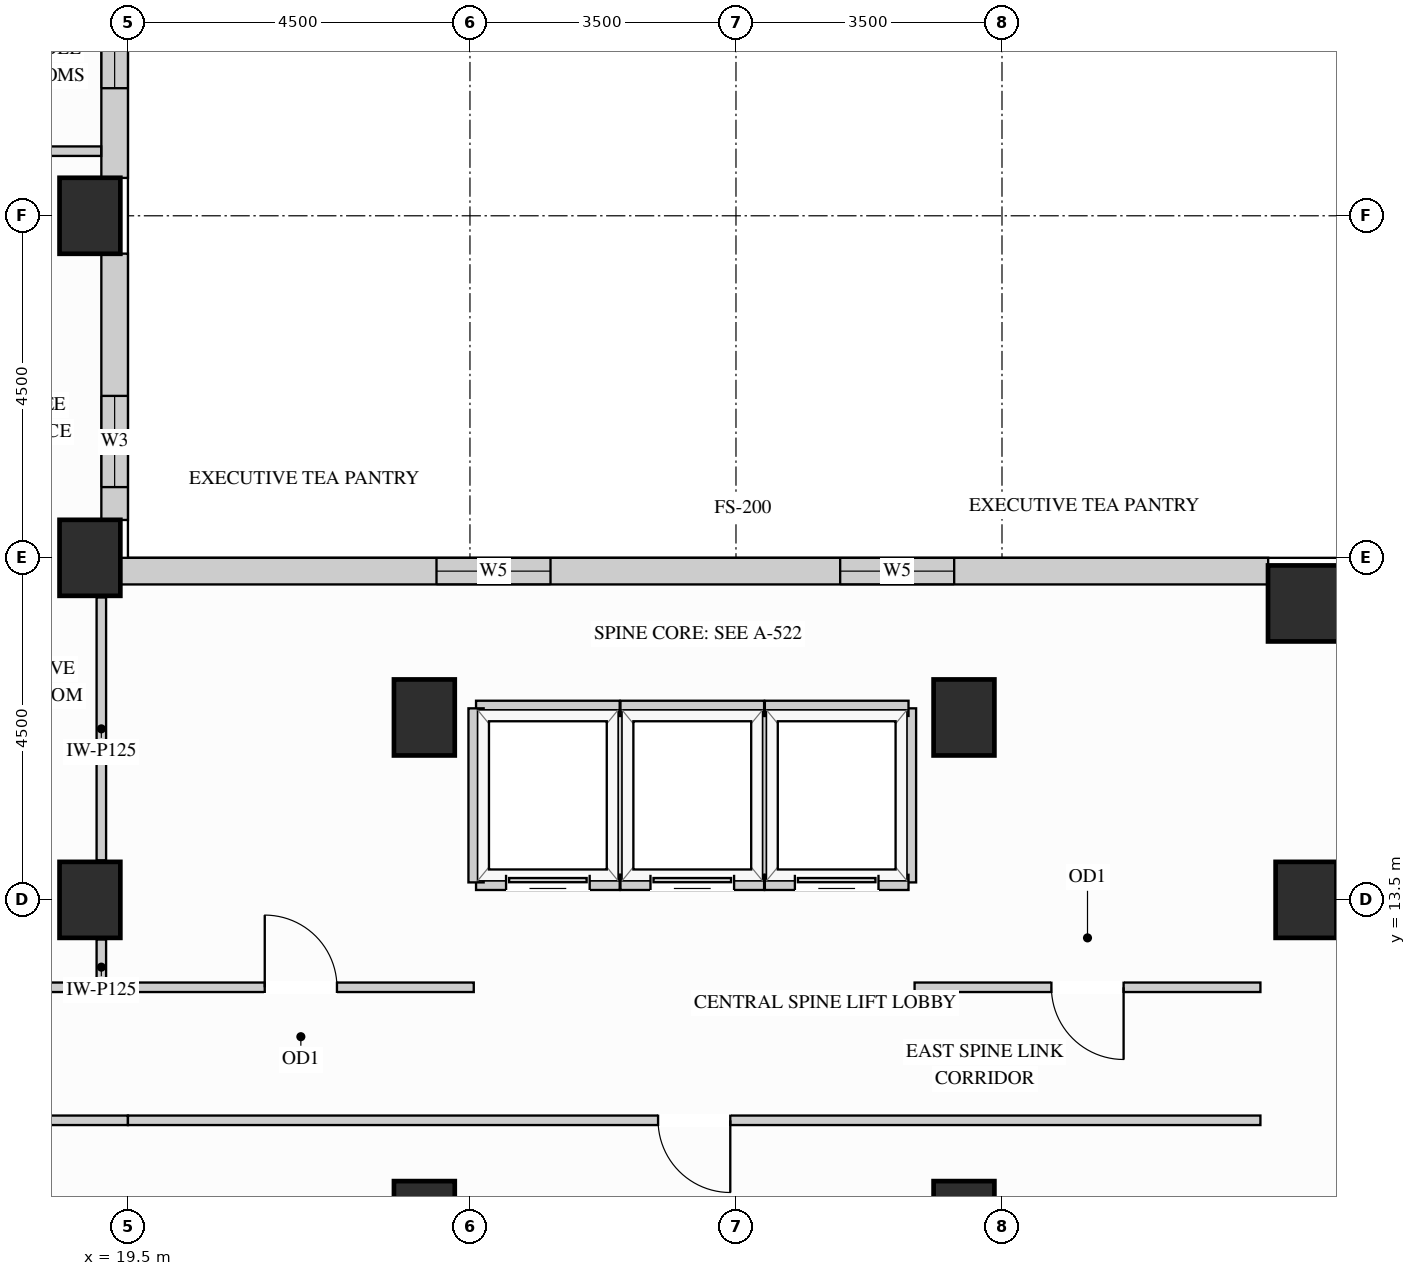
"""IFC4 building model, lengths in metres.
Left out: names, types, materials, properties, quantities, classifications, styles, units other than length and angle.
Written with IfcOpenShell. Run it as: python <this file> out.ifc"""

import sys

from ifc_helpers import new_model, si_unit, direction, frame, frame_2d, origin, origin_2d, place, context, subcontext, project, spatial, rectangle, extrude, source, transform, mapped, element, fill, save


model = new_model("IFC4")
c1 = context("Model", 3, precision=1e-05, world=origin(), true_north=direction((0.0, 1.0)))
c2 = subcontext(c1, "Body", "Model", "MODEL_VIEW")
j1 = project(units=[si_unit("LENGTHUNIT", "METRE"), si_unit("PLANEANGLEUNIT", "RADIAN")], contexts=[c1])
p1 = place(None, origin())
s1 = spatial("IfcSite", under=j1, at=p1, CompositionType="ELEMENT")
p2 = place(p1, origin())
s2 = spatial("IfcBuilding", under=s1, at=p2, CompositionType="ELEMENT")
p3 = place(p2, frame((0.0, 0.0, 179.1)))
s3 = spatial("IfcBuildingStorey", under=s2, at=p3, CompositionType="ELEMENT", Elevation=179.1)
m1 = source(origin(), c2, "Body", "SweptSolid", [
    extrude(rectangle(XDim=0.8, YDim=1.0, at=origin_2d()), origin(), (0.0, 0.0, 1.0), 3.4),
])
for number, where, z_axis, x_axis in (
    (1, (19.0, 13.5, 0.0), (0.0, 0.0, 1.0), (1.0, 0.0, 0.0)),
    (2, (19.0, 18.0, 0.0), (0.0, 0.0, 1.0), (1.0, 0.0, 0.0)),
    (3, (19.0, 22.5, 0.0), (0.0, 0.0, 1.0), (1.0, 0.0, 0.0)),
    (4, (35.0, 13.5, 0.0), (0.0, 0.0, 1.0), (1.0, 0.0, 0.0)),
    (5, (23.4, 15.9, 0.0), (0.0, 0.0, 1.0), (1.0, 0.0, 0.0)),
    (6, (23.4, 9.3, 0.0), (0.0, 0.0, 1.0), (1.0, 0.0, 0.0)),
    (7, (30.5, 15.9, 0.0), (0.0, 0.0, 1.0), (1.0, 0.0, 0.0)),
    (8, (30.5, 9.3, 0.0), (0.0, 0.0, 1.0), (1.0, 0.0, 0.0)),
):
    element("IfcColumn", number, at=place(p3, frame(where, z_axis=z_axis, x_axis=x_axis)), inside=s3, PredefinedType="COLUMN", context=c2, shape_type="MappedRepresentation", body=[
        mapped(m1, transform((0.0, 0.0, 0.0), x_axis=(1.0, 0.0, 0.0), y_axis=(0.0, 1.0, 0.0), z_axis=(0.0, 0.0, 1.0))),
    ])
m2 = source(origin(), c2, "Body", "SweptSolid", [
    extrude(rectangle(XDim=1.0, YDim=1.0, at=origin_2d()), origin(), (0.0, 0.0, 1.0), 3.4),
])
p4 = place(p3, frame((35.0, 17.4, 0.0), z_axis=(0.0, 0.0, 1.0), x_axis=(1.0, 0.0, 0.0)))
e9 = element("IfcColumn", 9, at=p4, inside=s3, PredefinedType="COLUMN", context=c2, shape_type="MappedRepresentation", body=[
    mapped(m2, transform((0.0, 0.0, 0.0), x_axis=(1.0, 0.0, 0.0), y_axis=(0.0, 1.0, 0.0), z_axis=(0.0, 0.0, 1.0))),
])
p5 = place(p3, frame((34.502, 17.825, 0.0), z_axis=(0.0, 0.0, 1.0), x_axis=(-1.0, 0.0, 0.0)))
e10 = element("IfcWall", 10, at=p5, inside=s3, PredefinedType="SOLIDWALL", context=c2, shape_type="SweptSolid", body=[
    extrude(rectangle(XDim=15.104, YDim=0.35, at=frame_2d((7.552, 0.0))), origin(), (0.0, 0.0, 1.0), 3.385),
])
p6 = place(p5, frame((4.131, 0.0, 0.78)))
e11 = element("IfcOpeningElement", 11, at=p6, cuts=e10, PredefinedType="OPENING", context=c2, shape_type="SweptSolid", body=[
    extrude(rectangle(XDim=1.5, YDim=2.0, at=frame_2d((0.75, 1.0))), frame((0.0, 0.185, 0.0), z_axis=(0.0, -1.0, 0.0), x_axis=(1.0, 0.0, 0.0)), (0.0, 0.0, 1.0), 0.37),
])
p7 = place(p5, frame((9.442, 0.0, 0.78)))
e12 = element("IfcOpeningElement", 12, at=p7, cuts=e10, PredefinedType="OPENING", context=c2, shape_type="SweptSolid", body=[
    extrude(rectangle(XDim=1.5, YDim=2.0, at=frame_2d((0.75, 1.0))), frame((0.0, 0.185, 0.0), z_axis=(0.0, -1.0, 0.0), x_axis=(1.0, 0.0, 0.0)), (0.0, 0.0, 1.0), 0.37),
])
p8 = place(p3, frame((19.325, 18.498, 0.0), z_axis=(0.0, 0.0, 1.0), x_axis=(0.0, 1.0, 0.0)))
e13 = element("IfcWall", 13, at=p8, inside=s3, PredefinedType="SOLIDWALL", context=c2, shape_type="SweptSolid", body=[
    extrude(rectangle(XDim=3.504, YDim=0.35, at=frame_2d((1.752, 0.0))), origin(), (0.0, 0.0, 1.0), 2.612),
])
p9 = place(p8, frame((0.433, 0.0, 0.78)))
e14 = element("IfcOpeningElement", 14, at=p9, cuts=e13, PredefinedType="OPENING", context=c2, shape_type="SweptSolid", body=[
    extrude(rectangle(XDim=1.2, YDim=1.652, at=frame_2d((0.6, 0.826))), frame((0.0, 0.185, 0.0), z_axis=(0.0, -1.0, 0.0), x_axis=(1.0, 0.0, 0.0)), (0.0, 0.0, 1.0), 0.37),
])
p10 = place(p3, frame((19.325, 22.998, 0.0), z_axis=(0.0, 0.0, 1.0), x_axis=(0.0, 1.0, 0.0)))
e15 = element("IfcWall", 15, at=p10, inside=s3, PredefinedType="SOLIDWALL", context=c2, shape_type="SweptSolid", body=[
    extrude(rectangle(XDim=3.304, YDim=0.35, at=frame_2d((1.652, 0.0))), origin(), (0.0, 0.0, 1.0), 2.612),
])
p11 = place(p10, frame((1.18, 0.0, 0.78)))
e16 = element("IfcOpeningElement", 16, at=p11, cuts=e15, PredefinedType="OPENING", context=c2, shape_type="SweptSolid", body=[
    extrude(rectangle(XDim=1.5, YDim=1.652, at=frame_2d((0.75, 0.826))), frame((0.0, 0.185, 0.0), z_axis=(0.0, -1.0, 0.0), x_axis=(1.0, 0.0, 0.0)), (0.0, 0.0, 1.0), 0.37),
])
m3 = source(origin(), c2, "Body", "SweptSolid", [
    extrude(rectangle(XDim=2.598, YDim=0.125, at=frame_2d((1.299, 0.0))), origin(), (0.0, 0.0, 1.0), 3.385),
])
p12 = place(p3, frame((16.55, 23.35, 0.0), z_axis=(0.0, 0.0, 1.0), x_axis=(1.0, 0.0, 0.0)))
e17 = element("IfcWall", 17, at=p12, inside=s3, PredefinedType="PARTITIONING", context=c2, shape_type="MappedRepresentation", body=[
    mapped(m3, transform((0.0, 0.0, 0.0), x_axis=(1.0, 0.0, 0.0), y_axis=(0.0, 1.0, 0.0), z_axis=(0.0, 0.0, 1.0))),
])
m4 = source(origin(), c2, "Body", "SweptSolid", [
    extrude(rectangle(XDim=0.63, YDim=0.125, at=frame_2d((0.315, 0.0))), origin(), (0.0, 0.0, 1.0), 2.773),
])
p13 = place(p3, frame((19.15, 12.35, 0.0), z_axis=(0.0, 0.0, 1.0), x_axis=(0.0, 1.0, 0.0)))
e18 = element("IfcWall", 18, at=p13, inside=s3, PredefinedType="PARTITIONING", context=c2, shape_type="MappedRepresentation", body=[
    mapped(m4, transform((0.0, 0.0, 0.0), x_axis=(1.0, 0.0, 0.0), y_axis=(0.0, 1.0, 0.0), z_axis=(0.0, 0.0, 1.0))),
])
m5 = source(origin(), c2, "Body", "SweptSolid", [
    extrude(rectangle(XDim=3.46, YDim=0.125, at=frame_2d((1.73, 0.0))), origin(), (0.0, 0.0, 1.0), 2.773),
])
p14 = place(p3, frame((19.15, 14.02, 0.0), z_axis=(0.0, 0.0, 1.0), x_axis=(0.0, 1.0, 0.0)))
e19 = element("IfcWall", 19, at=p14, inside=s3, PredefinedType="PARTITIONING", context=c2, shape_type="MappedRepresentation", body=[
    mapped(m5, transform((0.0, 0.0, 0.0), x_axis=(1.0, 0.0, 0.0), y_axis=(0.0, 1.0, 0.0), z_axis=(0.0, 0.0, 1.0))),
])
p15 = place(p3, frame((29.85, 12.35, 0.0), z_axis=(0.0, 0.0, 1.0), x_axis=(1.0, 0.0, 0.0)))
e20 = element("IfcWall", 20, at=p15, inside=s3, PredefinedType="PARTITIONING", context=c2, shape_type="SweptSolid", body=[
    extrude(rectangle(XDim=4.55, YDim=0.125, at=frame_2d((2.275, 0.0))), origin(), (0.0, 0.0, 1.0), 3.385),
])
p16 = place(p15, frame((1.8, 0.0, 0.0)))
e21 = element("IfcOpeningElement", 21, at=p16, cuts=e20, PredefinedType="OPENING", context=c2, shape_type="SweptSolid", body=[
    extrude(rectangle(XDim=0.95, YDim=2.15, at=frame_2d((0.475, 1.075))), frame((0.0, 0.073, 0.0), z_axis=(0.0, -1.0, 0.0), x_axis=(1.0, 0.0, 0.0)), (0.0, 0.0, 1.0), 0.145),
])
m6 = source(origin(), c2, "Body", "SweptSolid", [
    extrude(rectangle(XDim=2.95, YDim=0.125, at=frame_2d((1.475, 0.0))), origin(), (0.0, 0.0, 1.0), 3.385),
])
p17 = place(p3, frame((16.55, 12.35, 0.0), z_axis=(0.0, 0.0, 1.0), x_axis=(1.0, 0.0, 0.0)))
e22 = element("IfcWall", 22, at=p17, inside=s3, PredefinedType="PARTITIONING", context=c2, shape_type="MappedRepresentation", body=[
    mapped(m6, transform((0.0, 0.0, 0.0), x_axis=(1.0, 0.0, 0.0), y_axis=(0.0, 1.0, 0.0), z_axis=(0.0, 0.0, 1.0))),
])
p18 = place(p3, frame((19.5, 12.35, 0.0), z_axis=(0.0, 0.0, 1.0), x_axis=(1.0, 0.0, 0.0)))
e23 = element("IfcWall", 23, at=p18, inside=s3, PredefinedType="PARTITIONING", context=c2, shape_type="SweptSolid", body=[
    extrude(rectangle(XDim=4.55, YDim=0.125, at=frame_2d((2.275, 0.0))), origin(), (0.0, 0.0, 1.0), 3.385),
])
p19 = place(p18, frame((1.8, 0.0, 0.0)))
e24 = element("IfcOpeningElement", 24, at=p19, cuts=e23, PredefinedType="OPENING", context=c2, shape_type="SweptSolid", body=[
    extrude(rectangle(XDim=0.95, YDim=2.15, at=frame_2d((0.475, 1.075))), frame((0.0, 0.073, 0.0), z_axis=(0.0, -1.0, 0.0), x_axis=(1.0, 0.0, 0.0)), (0.0, 0.0, 1.0), 0.145),
])
p20 = place(p3, frame((16.55, 10.6, 0.0), z_axis=(0.0, 0.0, 1.0), x_axis=(1.0, 0.0, 0.0)))
e25 = element("IfcWall", 25, at=p20, inside=s3, PredefinedType="PARTITIONING", context=c2, shape_type="MappedRepresentation", body=[
    mapped(m6, transform((0.0, 0.0, 0.0), x_axis=(1.0, 0.0, 0.0), y_axis=(0.0, 1.0, 0.0), z_axis=(0.0, 0.0, 1.0))),
])
p21 = place(p3, frame((19.5, 10.6, 0.0), z_axis=(0.0, 0.0, 1.0), x_axis=(1.0, 0.0, 0.0)))
e26 = element("IfcWall", 26, at=p21, inside=s3, PredefinedType="PARTITIONING", context=c2, shape_type="SweptSolid", body=[
    extrude(rectangle(XDim=14.9, YDim=0.125, at=frame_2d((7.45, 0.0))), origin(), (0.0, 0.0, 1.0), 3.385),
])
p22 = place(p21, frame((6.975, 0.0, 0.0)))
e27 = element("IfcOpeningElement", 27, at=p22, cuts=e26, PredefinedType="OPENING", context=c2, shape_type="SweptSolid", body=[
    extrude(rectangle(XDim=0.95, YDim=2.15, at=frame_2d((0.475, 1.075))), frame((0.0, 0.073, 0.0), z_axis=(0.0, -1.0, 0.0), x_axis=(1.0, 0.0, 0.0)), (0.0, 0.0, 1.0), 0.145),
])
m7 = source(origin(), c2, "Body", "SweptSolid", [
    extrude(rectangle(XDim=2.29, YDim=0.2, at=frame_2d((1.145, 0.0))), origin(), (0.0, 0.0, 1.0), 3.385),
])
p23 = place(p3, frame((25.97, 13.73, 0.0), z_axis=(0.0, 0.0, 1.0), x_axis=(0.0, 1.0, 0.0)))
e28 = element("IfcWall", 28, at=p23, inside=s3, PredefinedType="PARTITIONING", context=c2, shape_type="MappedRepresentation", body=[
    mapped(m7, transform((0.0, 0.0, 0.0), x_axis=(1.0, 0.0, 0.0), y_axis=(0.0, 1.0, 0.0), z_axis=(0.0, 0.0, 1.0))),
])
m8 = source(origin(), c2, "Body", "SweptSolid", [
    extrude(rectangle(XDim=1.89, YDim=0.2, at=frame_2d((0.945, 0.0))), origin(), (0.0, 0.0, 1.0), 2.773),
])
p24 = place(p3, frame((24.08, 16.02, 0.0), z_axis=(0.0, 0.0, 1.0), x_axis=(1.0, 0.0, 0.0)))
e29 = element("IfcWall", 29, at=p24, inside=s3, PredefinedType="PARTITIONING", context=c2, shape_type="MappedRepresentation", body=[
    mapped(m8, transform((0.0, 0.0, 0.0), x_axis=(1.0, 0.0, 0.0), y_axis=(0.0, 1.0, 0.0), z_axis=(0.0, 0.0, 1.0))),
])
p25 = place(p3, frame((24.08, 13.73, 0.0), z_axis=(0.0, 0.0, 1.0), x_axis=(1.0, 0.0, 0.0)))
e30 = element("IfcWall", 30, at=p25, inside=s3, PredefinedType="PARTITIONING", context=c2, shape_type="SweptSolid", body=[
    extrude(rectangle(XDim=1.89, YDim=0.2, at=frame_2d((0.945, 0.0))), origin(), (0.0, 0.0, 1.0), 2.466),
])
p26 = place(p25, frame((0.395, 0.0, 0.0)))
e31 = element("IfcOpeningElement", 31, at=p26, cuts=e30, PredefinedType="OPENING", context=c2, shape_type="SweptSolid", body=[
    extrude(rectangle(XDim=1.1, YDim=2.2, at=frame_2d((0.55, 1.1))), frame((0.0, 0.11, 0.0), z_axis=(0.0, -1.0, 0.0), x_axis=(1.0, 0.0, 0.0)), (0.0, 0.0, 1.0), 0.22),
])
for number, where, z_axis, x_axis in (
    (32, (24.08, 13.73, 0.0), (0.0, 0.0, 1.0), (0.0, 1.0, 0.0)),
    (33, (27.87, 13.73, 0.0), (0.0, 0.0, 1.0), (0.0, 1.0, 0.0)),
):
    element("IfcWall", number, at=place(p3, frame(where, z_axis=z_axis, x_axis=x_axis)), inside=s3, PredefinedType="PARTITIONING", context=c2, shape_type="MappedRepresentation", body=[
        mapped(m7, transform((0.0, 0.0, 0.0), x_axis=(1.0, 0.0, 0.0), y_axis=(0.0, 1.0, 0.0), z_axis=(0.0, 0.0, 1.0))),
    ])
m9 = source(origin(), c2, "Body", "SweptSolid", [
    extrude(rectangle(XDim=1.89, YDim=0.2, at=frame_2d((0.945, 0.0))), origin(), (0.0, 0.0, 1.0), 2.773),
])
p27 = place(p3, frame((25.98, 16.02, 0.0), z_axis=(0.0, 0.0, 1.0), x_axis=(1.0, 0.0, 0.0)))
e34 = element("IfcWall", 34, at=p27, inside=s3, PredefinedType="PARTITIONING", context=c2, shape_type="MappedRepresentation", body=[
    mapped(m9, transform((0.0, 0.0, 0.0), x_axis=(1.0, 0.0, 0.0), y_axis=(0.0, 1.0, 0.0), z_axis=(0.0, 0.0, 1.0))),
])
p28 = place(p3, frame((25.98, 13.73, 0.0), z_axis=(0.0, 0.0, 1.0), x_axis=(1.0, 0.0, 0.0)))
e35 = element("IfcWall", 35, at=p28, inside=s3, PredefinedType="PARTITIONING", context=c2, shape_type="SweptSolid", body=[
    extrude(rectangle(XDim=1.89, YDim=0.2, at=frame_2d((0.945, 0.0))), origin(), (0.0, 0.0, 1.0), 2.466),
])
p29 = place(p28, frame((0.395, 0.0, 0.0)))
e36 = element("IfcOpeningElement", 36, at=p29, cuts=e35, PredefinedType="OPENING", context=c2, shape_type="SweptSolid", body=[
    extrude(rectangle(XDim=1.1, YDim=2.2, at=frame_2d((0.55, 1.1))), frame((0.0, 0.11, 0.0), z_axis=(0.0, -1.0, 0.0), x_axis=(1.0, 0.0, 0.0)), (0.0, 0.0, 1.0), 0.22),
])
p30 = place(p3, frame((29.77, 13.73, 0.0), z_axis=(0.0, 0.0, 1.0), x_axis=(0.0, 1.0, 0.0)))
e37 = element("IfcWall", 37, at=p30, inside=s3, PredefinedType="PARTITIONING", context=c2, shape_type="MappedRepresentation", body=[
    mapped(m7, transform((0.0, 0.0, 0.0), x_axis=(1.0, 0.0, 0.0), y_axis=(0.0, 1.0, 0.0), z_axis=(0.0, 0.0, 1.0))),
])
p31 = place(p3, frame((27.88, 16.02, 0.0), z_axis=(0.0, 0.0, 1.0), x_axis=(1.0, 0.0, 0.0)))
e38 = element("IfcWall", 38, at=p31, inside=s3, PredefinedType="PARTITIONING", context=c2, shape_type="MappedRepresentation", body=[
    mapped(m9, transform((0.0, 0.0, 0.0), x_axis=(1.0, 0.0, 0.0), y_axis=(0.0, 1.0, 0.0), z_axis=(0.0, 0.0, 1.0))),
])
p32 = place(p3, frame((27.88, 13.73, 0.0), z_axis=(0.0, 0.0, 1.0), x_axis=(1.0, 0.0, 0.0)))
e39 = element("IfcWall", 39, at=p32, inside=s3, PredefinedType="PARTITIONING", context=c2, shape_type="SweptSolid", body=[
    extrude(rectangle(XDim=1.89, YDim=0.2, at=frame_2d((0.945, 0.0))), origin(), (0.0, 0.0, 1.0), 2.466),
])
p33 = place(p32, frame((0.395, 0.0, 0.0)))
e40 = element("IfcOpeningElement", 40, at=p33, cuts=e39, PredefinedType="OPENING", context=c2, shape_type="SweptSolid", body=[
    extrude(rectangle(XDim=1.1, YDim=2.2, at=frame_2d((0.55, 1.1))), frame((0.0, 0.11, 0.0), z_axis=(0.0, -1.0, 0.0), x_axis=(1.0, 0.0, 0.0)), (0.0, 0.0, 1.0), 0.22),
])
m10 = source(origin(), c2, "Body", "SweptSolid", [
    extrude(rectangle(XDim=1.1, YDim=2.2, at=frame_2d((0.55, 1.1))), frame((0.0, 0.025, 0.0), z_axis=(0.0, -1.0, 0.0), x_axis=(1.0, 0.0, 0.0)), (0.0, 0.0, 1.0), 0.05),
])
p34 = place(p26, origin())
e41 = element("IfcDoor", 41, at=p34, inside=s3, OperationType="SLIDING_TO_LEFT", PredefinedType="DOOR", context=c2, shape_type="MappedRepresentation", body=[
    mapped(m10, transform((0.0, 0.0, 0.0), x_axis=(1.0, 0.0, 0.0), y_axis=(0.0, 1.0, 0.0), z_axis=(0.0, 0.0, 1.0))),
])
fill(e31, e41)
p35 = place(p29, origin())
e42 = element("IfcDoor", 42, at=p35, inside=s3, OperationType="SLIDING_TO_LEFT", PredefinedType="DOOR", context=c2, shape_type="MappedRepresentation", body=[
    mapped(m10, transform((0.0, 0.0, 0.0), x_axis=(1.0, 0.0, 0.0), y_axis=(0.0, 1.0, 0.0), z_axis=(0.0, 0.0, 1.0))),
])
fill(e36, e42)
p36 = place(p33, origin())
e43 = element("IfcDoor", 43, at=p36, inside=s3, OperationType="SLIDING_TO_LEFT", PredefinedType="DOOR", context=c2, shape_type="MappedRepresentation", body=[
    mapped(m10, transform((0.0, 0.0, 0.0), x_axis=(1.0, 0.0, 0.0), y_axis=(0.0, 1.0, 0.0), z_axis=(0.0, 0.0, 1.0))),
])
fill(e40, e43)
m11 = source(origin(), c2, "Body", "SweptSolid", [
    extrude(rectangle(XDim=0.95, YDim=2.15, at=frame_2d((0.475, 1.075))), frame((0.0, 0.025, 0.0), z_axis=(0.0, -1.0, 0.0), x_axis=(1.0, 0.0, 0.0)), (0.0, 0.0, 1.0), 0.05),
])
p37 = place(p19, origin())
e44 = element("IfcDoor", 44, at=p37, inside=s3, OperationType="SINGLE_SWING_LEFT", PredefinedType="DOOR", context=c2, shape_type="MappedRepresentation", body=[
    mapped(m11, transform((0.0, 0.0, 0.0), x_axis=(1.0, 0.0, 0.0), y_axis=(0.0, 1.0, 0.0), z_axis=(0.0, 0.0, 1.0))),
])
fill(e24, e44)
p38 = place(p16, origin())
e45 = element("IfcDoor", 45, at=p38, inside=s3, OperationType="SINGLE_SWING_RIGHT", PredefinedType="DOOR", context=c2, shape_type="MappedRepresentation", body=[
    mapped(m11, transform((0.0, 0.0, 0.0), x_axis=(1.0, 0.0, 0.0), y_axis=(0.0, 1.0, 0.0), z_axis=(0.0, 0.0, 1.0))),
])
fill(e21, e45)
p39 = place(p22, origin())
e46 = element("IfcDoor", 46, at=p39, inside=s3, OperationType="SINGLE_SWING_RIGHT", PredefinedType="DOOR", context=c2, shape_type="MappedRepresentation", body=[
    mapped(m11, transform((0.0, 0.0, 0.0), x_axis=(1.0, 0.0, 0.0), y_axis=(0.0, 1.0, 0.0), z_axis=(0.0, 0.0, 1.0))),
])
fill(e27, e46)
m12 = source(origin(), c2, "Body", "SweptSolid", [
    extrude(rectangle(XDim=1.2, YDim=1.652, at=frame_2d((0.6, 0.826))), frame((0.0, 0.03, 0.0), z_axis=(0.0, -1.0, 0.0), x_axis=(1.0, 0.0, 0.0)), (0.0, 0.0, 1.0), 0.06),
])
p40 = place(p9, origin())
e47 = element("IfcWindow", 47, at=p40, inside=s3, PartitioningType="SINGLE_PANEL", PredefinedType="WINDOW", context=c2, shape_type="MappedRepresentation", body=[
    mapped(m12, transform((0.0, 0.0, 0.0), x_axis=(1.0, 0.0, 0.0), y_axis=(0.0, 1.0, 0.0), z_axis=(0.0, 0.0, 1.0))),
])
fill(e14, e47)
m13 = source(origin(), c2, "Body", "SweptSolid", [
    extrude(rectangle(XDim=1.5, YDim=2.0, at=frame_2d((0.75, 1.0))), frame((0.0, 0.03, 0.0), z_axis=(0.0, -1.0, 0.0), x_axis=(1.0, 0.0, 0.0)), (0.0, 0.0, 1.0), 0.06),
])
p41 = place(p6, origin())
e48 = element("IfcWindow", 48, at=p41, inside=s3, PartitioningType="SINGLE_PANEL", PredefinedType="WINDOW", context=c2, shape_type="MappedRepresentation", body=[
    mapped(m13, transform((0.0, 0.0, 0.0), x_axis=(1.0, 0.0, 0.0), y_axis=(0.0, 1.0, 0.0), z_axis=(0.0, 0.0, 1.0))),
])
fill(e11, e48)
p42 = place(p7, origin())
e49 = element("IfcWindow", 49, at=p42, inside=s3, PartitioningType="SINGLE_PANEL", PredefinedType="WINDOW", context=c2, shape_type="MappedRepresentation", body=[
    mapped(m13, transform((0.0, 0.0, 0.0), x_axis=(1.0, 0.0, 0.0), y_axis=(0.0, 1.0, 0.0), z_axis=(0.0, 0.0, 1.0))),
])
fill(e12, e49)
m14 = source(origin(), c2, "Body", "SweptSolid", [
    extrude(rectangle(XDim=1.5, YDim=1.652, at=frame_2d((0.75, 0.826))), frame((0.0, 0.03, 0.0), z_axis=(0.0, -1.0, 0.0), x_axis=(1.0, 0.0, 0.0)), (0.0, 0.0, 1.0), 0.06),
])
p43 = place(p11, origin())
e50 = element("IfcWindow", 50, at=p43, inside=s3, PartitioningType="SINGLE_PANEL", PredefinedType="WINDOW", context=c2, shape_type="MappedRepresentation", body=[
    mapped(m14, transform((0.0, 0.0, 0.0), x_axis=(1.0, 0.0, 0.0), y_axis=(0.0, 1.0, 0.0), z_axis=(0.0, 0.0, 1.0))),
])
fill(e16, e50)
save(model, sys.argv[1])
